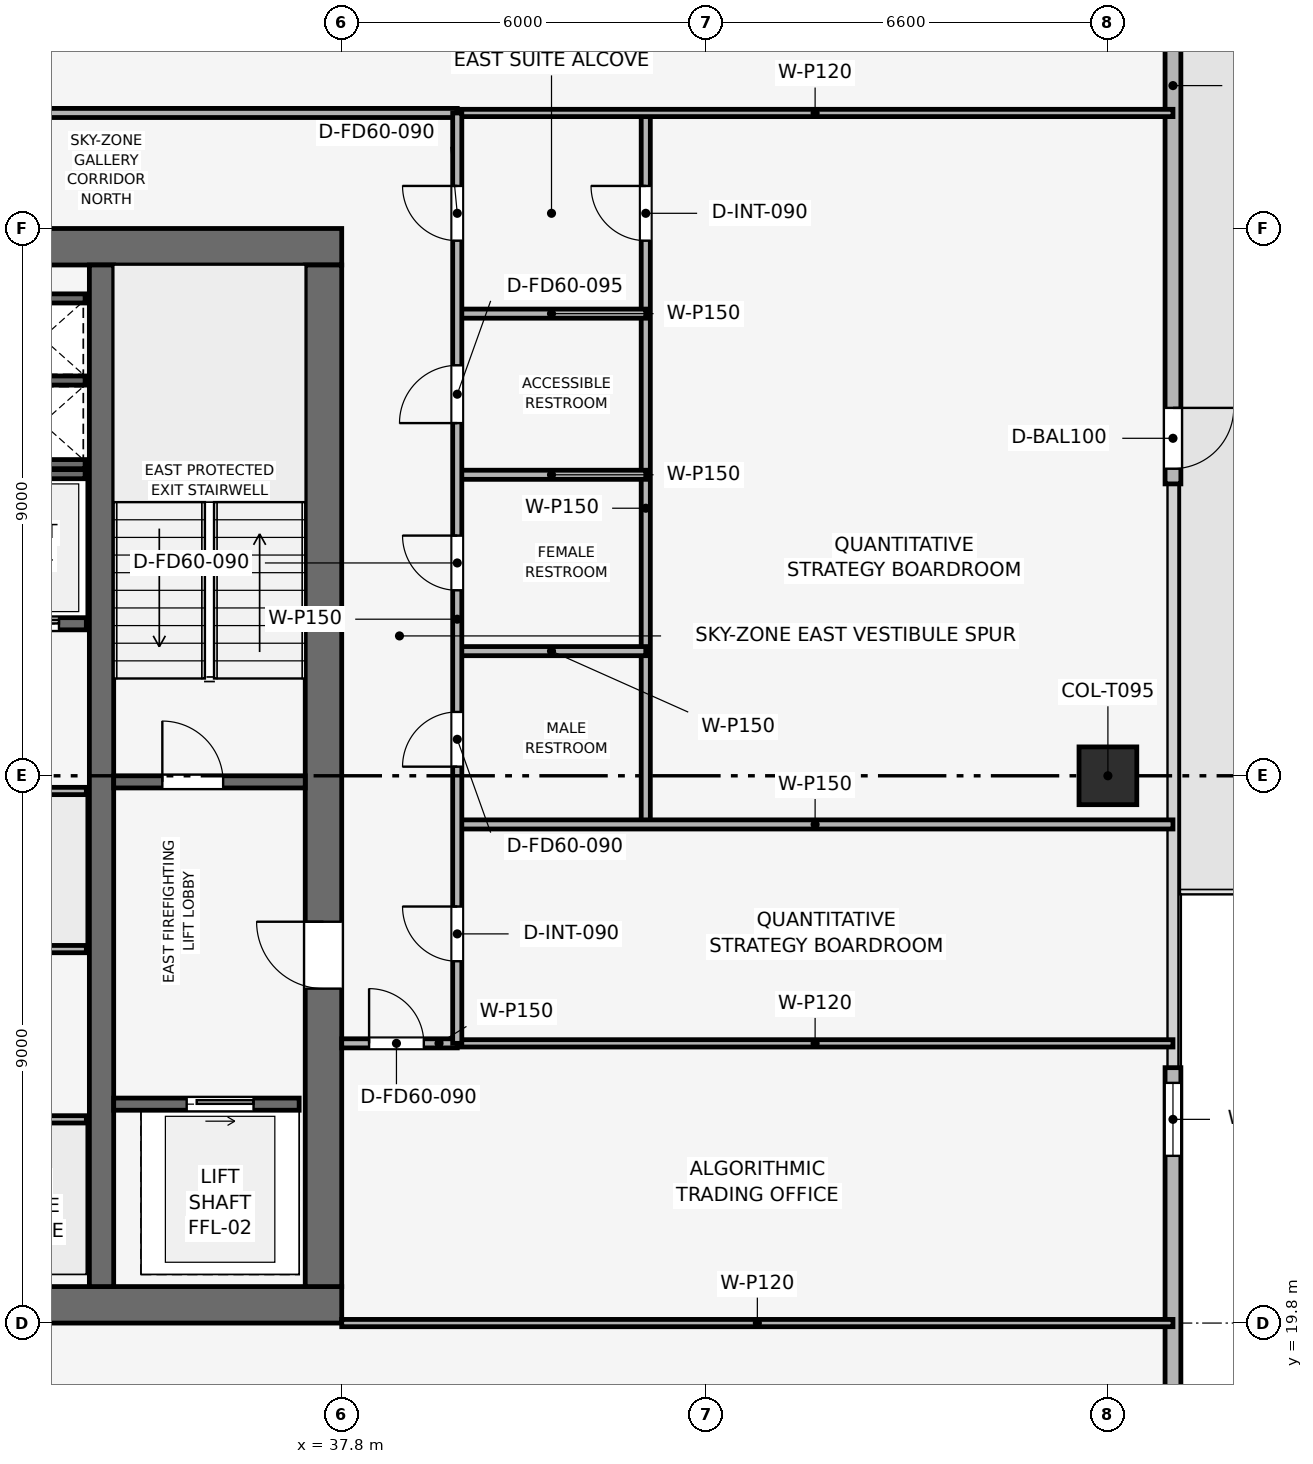
"""IFC4 building model, lengths in metres.
Left out: names, types, materials, properties, quantities, classifications, styles, units other than length and angle.
Written with IfcOpenShell. Run it as: python <this file> out.ifc"""

import sys

from ifc_helpers import new_model, si_unit, direction, frame, frame_2d, origin, origin_2d, place, context, subcontext, project, spatial, rectangle, extrude, element, fill, save


model = new_model("IFC4")
c1 = context("Model", 3, precision=1e-05, world=origin(), true_north=direction((0.0, 1.0)))
c2 = subcontext(c1, "Body", "Model", "MODEL_VIEW")
j1 = project(units=[si_unit("LENGTHUNIT", "METRE"), si_unit("PLANEANGLEUNIT", "RADIAN")], contexts=[c1])
p1 = place(None, origin())
s1 = spatial("IfcSite", under=j1, at=p1, CompositionType="ELEMENT")
p2 = place(p1, origin())
s2 = spatial("IfcBuilding", under=s1, at=p2, CompositionType="ELEMENT")
p3 = place(p2, frame((0.0, 0.0, 310.5)))
s3 = spatial("IfcBuildingStorey", under=s2, at=p3, CompositionType="ELEMENT", Elevation=310.5)
p4 = place(p3, frame((19.8, 20.1, 0.0), z_axis=(0.0, 0.0, 1.0), x_axis=(1.0, 0.0, 0.0)))
e1 = element("IfcWall", 1, at=p4, inside=s3, PredefinedType="SHEAR", context=c2, shape_type="SweptSolid", body=[
    extrude(rectangle(XDim=18.0, YDim=0.6, at=frame_2d((9.0, 0.0))), origin(), (0.0, 0.0, 1.0), 3.75),
])
p5 = place(p3, frame((19.8, 37.5, 0.0), z_axis=(0.0, 0.0, 1.0), x_axis=(1.0, 0.0, 0.0)))
e2 = element("IfcWall", 2, at=p5, inside=s3, PredefinedType="SHEAR", context=c2, shape_type="SweptSolid", body=[
    extrude(rectangle(XDim=18.0, YDim=0.6, at=frame_2d((9.0, 0.0))), origin(), (0.0, 0.0, 1.0), 3.75),
])
p6 = place(p5, frame((7.05, 0.0, 0.0)))
e3 = element("IfcOpeningElement", 3, at=p6, cuts=e2, PredefinedType="OPENING", context=c2, shape_type="SweptSolid", body=[
    extrude(rectangle(XDim=1.1, YDim=2.15, at=frame_2d((0.55, 1.075))), frame((0.0, 0.31, 0.0), z_axis=(0.0, -1.0, 0.0), x_axis=(1.0, 0.0, 0.0)), (0.0, 0.0, 1.0), 0.62),
])
p7 = place(p3, frame((37.5, 20.4, 0.0), z_axis=(0.0, 0.0, 1.0), x_axis=(0.0, 1.0, 0.0)))
e4 = element("IfcWall", 4, at=p7, inside=s3, PredefinedType="SHEAR", context=c2, shape_type="SweptSolid", body=[
    extrude(rectangle(XDim=16.8, YDim=0.6, at=frame_2d((8.4, 0.0))), origin(), (0.0, 0.0, 1.0), 3.75),
])
p8 = place(p7, frame((4.9, 0.0, 0.0)))
e5 = element("IfcOpeningElement", 5, at=p8, cuts=e4, PredefinedType="OPENING", context=c2, shape_type="SweptSolid", body=[
    extrude(rectangle(XDim=1.1, YDim=2.15, at=frame_2d((0.55, 1.075))), frame((0.0, 0.31, 0.0), z_axis=(0.0, -1.0, 0.0), x_axis=(1.0, 0.0, 0.0)), (0.0, 0.0, 1.0), 0.62),
])
p9 = place(p3, frame((33.85, 20.4, 0.0), z_axis=(0.0, 0.0, 1.0), x_axis=(0.0, 1.0, 0.0)))
e6 = element("IfcWall", 6, at=p9, inside=s3, PredefinedType="SHEAR", context=c2, shape_type="SweptSolid", body=[
    extrude(rectangle(XDim=16.8, YDim=0.4, at=frame_2d((8.4, 0.0))), origin(), (0.0, 0.0, 1.0), 3.75),
])
p10 = place(p3, frame((50.4, 28.8, 0.003), z_axis=(0.0, 0.0, 1.0), x_axis=(1.0, 0.0, 0.0)))
e7 = element("IfcColumn", 7, at=p10, inside=s3, PredefinedType="COLUMN", context=c2, shape_type="SweptSolid", body=[
    extrude(rectangle(XDim=0.95, YDim=0.95, at=origin_2d()), origin(), (0.0, 0.0, 1.0), 3.504),
])
p11 = place(p3, frame((51.47, 45.3, 0.0), z_axis=(0.0, 0.0, 1.0), x_axis=(0.0, -1.0, 0.0)))
e8 = element("IfcWall", 8, at=p11, inside=s3, PredefinedType="SOLIDWALL", context=c2, shape_type="SweptSolid", body=[
    extrude(rectangle(XDim=11.7, YDim=0.26, at=frame_2d((5.85, 0.0))), origin(), (0.0, 0.0, 1.0), 3.51),
])
p12 = place(p11, frame((10.45, 0.0, 0.0)))
e9 = element("IfcOpeningElement", 9, at=p12, cuts=e8, PredefinedType="OPENING", context=c2, shape_type="SweptSolid", body=[
    extrude(rectangle(XDim=1.0, YDim=2.2, at=frame_2d((0.5, 1.1))), frame((0.0, 0.14, 0.0), z_axis=(0.0, -1.0, 0.0), x_axis=(1.0, 0.0, 0.0)), (0.0, 0.0, 1.0), 0.28),
])
p13 = place(p3, frame((51.47, 24.0, 0.0), z_axis=(0.0, 0.0, 1.0), x_axis=(0.0, -1.0, 0.0)))
e10 = element("IfcWall", 10, at=p13, inside=s3, PredefinedType="SOLIDWALL", context=c2, shape_type="SweptSolid", body=[
    extrude(rectangle(XDim=11.7, YDim=0.26, at=frame_2d((5.85, 0.0))), origin(), (0.0, 0.0, 1.0), 3.51),
])
p14 = place(p13, frame((0.25, 0.0, 0.9)))
e11 = element("IfcOpeningElement", 11, at=p14, cuts=e10, PredefinedType="OPENING", context=c2, shape_type="SweptSolid", body=[
    extrude(rectangle(XDim=1.2, YDim=2.1, at=frame_2d((0.6, 1.05))), frame((0.0, 0.14, 0.0), z_axis=(0.0, -1.0, 0.0), x_axis=(1.0, 0.0, 0.0)), (0.0, 0.0, 1.0), 0.28),
])
p15 = place(p3, frame((34.05, 28.7, 0.0), z_axis=(0.0, 0.0, 1.0), x_axis=(1.0, 0.0, 0.0)))
e12 = element("IfcWall", 12, at=p15, inside=s3, PredefinedType="SHEAR", context=c2, shape_type="SweptSolid", body=[
    extrude(rectangle(XDim=3.15, YDim=0.2, at=frame_2d((1.575, 0.0))), origin(), (0.0, 0.0, 1.0), 3.51),
])
p16 = place(p15, frame((0.8, 0.0, 0.0)))
e13 = element("IfcOpeningElement", 13, at=p16, cuts=e12, PredefinedType="OPENING", context=c2, shape_type="SweptSolid", body=[
    extrude(rectangle(XDim=1.0, YDim=2.1, at=frame_2d((0.5, 1.05))), frame((0.0, 0.11, 0.0), z_axis=(0.0, -1.0, 0.0), x_axis=(1.0, 0.0, 0.0)), (0.0, 0.0, 1.0), 0.22),
])
for number, where, z_axis, x_axis in (
    (14, (32.25, 33.925, 0.0), (0.0, 0.0, 1.0), (1.0, 0.0, 0.0)),
    (15, (32.25, 35.3, 0.0), (0.0, 0.0, 1.0), (1.0, 0.0, 0.0)),
):
    element("IfcWall", number, at=place(p3, frame(where, z_axis=z_axis, x_axis=x_axis)), inside=s3, PredefinedType="SHEAR", context=c2, shape_type="SweptSolid", body=[
        extrude(rectangle(XDim=1.33, YDim=0.15, at=frame_2d((0.665, 0.0))), origin(), (0.0, 0.0, 1.0), 3.51),
    ])
p17 = place(p3, frame((34.05, 23.4, 0.0), z_axis=(0.0, 0.0, 1.0), x_axis=(1.0, 0.0, 0.0)))
e16 = element("IfcWall", 16, at=p17, inside=s3, PredefinedType="SHEAR", context=c2, shape_type="SweptSolid", body=[
    extrude(rectangle(XDim=3.05, YDim=0.2, at=frame_2d((1.525, 0.0))), origin(), (0.0, 0.0, 1.0), 3.51),
])
p18 = place(p17, frame((1.2, 0.0, 0.0)))
e17 = element("IfcOpeningElement", 17, at=p18, cuts=e16, PredefinedType="OPENING", context=c2, shape_type="SweptSolid", body=[
    extrude(rectangle(XDim=1.1, YDim=2.15, at=frame_2d((0.55, 1.075))), frame((0.0, 0.11, 0.0), z_axis=(0.0, -1.0, 0.0), x_axis=(1.0, 0.0, 0.0)), (0.0, 0.0, 1.0), 0.22),
])
p19 = place(p3, frame((31.6, 31.3, 0.0), z_axis=(0.0, 0.0, 1.0), x_axis=(1.0, 0.0, 0.0)))
e18 = element("IfcWall", 18, at=p19, inside=s3, PredefinedType="SHEAR", context=c2, shape_type="SweptSolid", body=[
    extrude(rectangle(XDim=2.0, YDim=0.2, at=frame_2d((1.0, 0.0))), origin(), (0.0, 0.0, 1.0), 3.51),
])
p20 = place(p19, frame((0.45, 0.0, 0.0)))
e19 = element("IfcOpeningElement", 19, at=p20, cuts=e18, PredefinedType="OPENING", context=c2, shape_type="SweptSolid", body=[
    extrude(rectangle(XDim=1.1, YDim=2.15, at=frame_2d((0.55, 1.075))), frame((0.0, 0.11, 0.0), z_axis=(0.0, -1.0, 0.0), x_axis=(1.0, 0.0, 0.0)), (0.0, 0.0, 1.0), 0.22),
])
p21 = place(p3, frame((32.25, 36.65, 0.0), z_axis=(0.0, 0.0, 1.0), x_axis=(1.0, 0.0, 0.0)))
e20 = element("IfcWall", 20, at=p21, inside=s3, PredefinedType="SHEAR", context=c2, shape_type="SweptSolid", body=[
    extrude(rectangle(XDim=1.33, YDim=0.15, at=frame_2d((0.665, 0.0))), origin(), (0.0, 0.0, 1.0), 3.51),
])
p22 = place(p3, frame((29.5, 33.76, 0.0), z_axis=(0.0, 0.0, 1.0), x_axis=(1.0, 0.0, 0.0)))
e21 = element("IfcWall", 21, at=p22, inside=s3, PredefinedType="SHEAR", context=c2, shape_type="SweptSolid", body=[
    extrude(rectangle(XDim=4.08, YDim=0.15, at=frame_2d((2.04, 0.0))), origin(), (0.0, 0.0, 1.0), 3.51),
])
p23 = place(p3, frame((29.55, 23.15, 0.0), z_axis=(0.0, 0.0, 1.0), x_axis=(1.0, 0.0, 0.0)))
e22 = element("IfcWall", 22, at=p23, inside=s3, PredefinedType="PARTITIONING", context=c2, shape_type="SweptSolid", body=[
    extrude(rectangle(XDim=4.05, YDim=0.12, at=frame_2d((2.025, 0.0))), origin(), (0.0, 0.0, 1.0), 3.51),
])
p24 = place(p23, frame((1.575, 0.0, 0.0)))
e23 = element("IfcOpeningElement", 23, at=p24, cuts=e22, PredefinedType="OPENING", context=c2, shape_type="SweptSolid", body=[
    extrude(rectangle(XDim=0.9, YDim=2.1, at=frame_2d((0.45, 1.05))), frame((0.0, 0.07, 0.0), z_axis=(0.0, -1.0, 0.0), x_axis=(1.0, 0.0, 0.0)), (0.0, 0.0, 1.0), 0.14),
])
p25 = place(p3, frame((29.55, 25.95, 0.0), z_axis=(0.0, 0.0, 1.0), x_axis=(1.0, 0.0, 0.0)))
e24 = element("IfcWall", 24, at=p25, inside=s3, PredefinedType="PARTITIONING", context=c2, shape_type="SweptSolid", body=[
    extrude(rectangle(XDim=4.05, YDim=0.12, at=frame_2d((2.025, 0.0))), origin(), (0.0, 0.0, 1.0), 3.51),
])
p26 = place(p25, frame((1.575, 0.0, 0.0)))
e25 = element("IfcOpeningElement", 25, at=p26, cuts=e24, PredefinedType="OPENING", context=c2, shape_type="SweptSolid", body=[
    extrude(rectangle(XDim=0.9, YDim=2.1, at=frame_2d((0.45, 1.05))), frame((0.0, 0.07, 0.0), z_axis=(0.0, -1.0, 0.0), x_axis=(1.0, 0.0, 0.0)), (0.0, 0.0, 1.0), 0.14),
])
p27 = place(p3, frame((29.55, 28.55, 0.0), z_axis=(0.0, 0.0, 1.0), x_axis=(1.0, 0.0, 0.0)))
e26 = element("IfcWall", 26, at=p27, inside=s3, PredefinedType="PARTITIONING", context=c2, shape_type="SweptSolid", body=[
    extrude(rectangle(XDim=4.05, YDim=0.12, at=frame_2d((2.025, 0.0))), origin(), (0.0, 0.0, 1.0), 3.51),
])
p28 = place(p3, frame((37.8, 19.8, 0.0), z_axis=(0.0, 0.0, 1.0), x_axis=(1.0, 0.0, 0.0)))
e27 = element("IfcWall", 27, at=p28, inside=s3, PredefinedType="PARTITIONING", context=c2, shape_type="SweptSolid", body=[
    extrude(rectangle(XDim=13.67, YDim=0.12, at=frame_2d((6.835, 0.0))), origin(), (0.0, 0.0, 1.0), 3.095),
])
p29 = place(p3, frame((37.8, 24.4, 0.0), z_axis=(0.0, 0.0, 1.0), x_axis=(1.0, 0.0, 0.0)))
e28 = element("IfcWall", 28, at=p29, inside=s3, PredefinedType="PARTITIONING", context=c2, shape_type="SweptSolid", body=[
    extrude(rectangle(XDim=1.9, YDim=0.15, at=frame_2d((0.95, 0.0))), origin(), (0.0, 0.0, 1.0), 3.51),
])
p30 = place(p29, frame((0.45, 0.0, 0.0)))
e29 = element("IfcOpeningElement", 29, at=p30, cuts=e28, PredefinedType="OPENING", context=c2, shape_type="SweptSolid", body=[
    extrude(rectangle(XDim=0.9, YDim=2.1, at=frame_2d((0.45, 1.05))), frame((0.0, 0.085, 0.0), z_axis=(0.0, -1.0, 0.0), x_axis=(1.0, 0.0, 0.0)), (0.0, 0.0, 1.0), 0.17),
])
p31 = place(p3, frame((39.7, 24.4, 0.0), z_axis=(0.0, 0.0, 1.0), x_axis=(1.0, 0.0, 0.0)))
e30 = element("IfcWall", 30, at=p31, inside=s3, PredefinedType="PARTITIONING", context=c2, shape_type="SweptSolid", body=[
    extrude(rectangle(XDim=11.77, YDim=0.12, at=frame_2d((5.885, 0.0))), origin(), (0.0, 0.0, 1.0), 3.135),
])
p32 = place(p3, frame((42.8, 28.0, 0.0), z_axis=(0.0, 0.0, 1.0), x_axis=(0.0, 1.0, 0.0)))
e31 = element("IfcWall", 31, at=p32, inside=s3, PredefinedType="PARTITIONING", context=c2, shape_type="SweptSolid", body=[
    extrude(rectangle(XDim=11.7, YDim=0.15, at=frame_2d((5.85, 0.0))), origin(), (0.0, 0.0, 1.0), 3.095),
])
p33 = place(p32, frame((9.6, 0.0, 0.0)))
e32 = element("IfcOpeningElement", 32, at=p33, cuts=e31, PredefinedType="OPENING", context=c2, shape_type="SweptSolid", body=[
    extrude(rectangle(XDim=0.9, YDim=2.1, at=frame_2d((0.45, 1.05))), frame((0.0, 0.085, 0.0), z_axis=(0.0, -1.0, 0.0), x_axis=(1.0, 0.0, 0.0)), (0.0, 0.0, 1.0), 0.17),
])
p34 = place(p3, frame((39.7, 28.0, 0.0), z_axis=(0.0, 0.0, 1.0), x_axis=(1.0, 0.0, 0.0)))
e33 = element("IfcWall", 33, at=p34, inside=s3, PredefinedType="PARTITIONING", context=c2, shape_type="SweptSolid", body=[
    extrude(rectangle(XDim=11.77, YDim=0.15, at=frame_2d((5.885, 0.0))), origin(), (0.0, 0.0, 1.0), 3.135),
])
for number, where, z_axis, x_axis in (
    (34, (39.7, 36.4, 0.0), (0.0, 0.0, 1.0), (1.0, 0.0, 0.0)),
    (35, (39.7, 30.85, 0.0), (0.0, 0.0, 1.0), (1.0, 0.0, 0.0)),
    (36, (39.7, 33.75, 0.0), (0.0, 0.0, 1.0), (1.0, 0.0, 0.0)),
):
    element("IfcWall", number, at=place(p3, frame(where, z_axis=z_axis, x_axis=x_axis)), inside=s3, PredefinedType="PARTITIONING", context=c2, shape_type="SweptSolid", body=[
        extrude(rectangle(XDim=3.1, YDim=0.15, at=frame_2d((1.55, 0.0))), origin(), (0.0, 0.0, 1.0), 3.135),
    ])
p35 = place(p3, frame((39.7, 39.7, 0.0), z_axis=(0.0, 0.0, 1.0), x_axis=(1.0, 0.0, 0.0)))
e37 = element("IfcWall", 37, at=p35, inside=s3, PredefinedType="PARTITIONING", context=c2, shape_type="SweptSolid", body=[
    extrude(rectangle(XDim=11.77, YDim=0.12, at=frame_2d((5.885, 0.0))), origin(), (0.0, 0.0, 1.0), 3.095),
])
p36 = place(p3, frame((17.9, 39.7, 0.0), z_axis=(0.0, 0.0, 1.0), x_axis=(1.0, 0.0, 0.0)))
e38 = element("IfcWall", 38, at=p36, inside=s3, PredefinedType="PARTITIONING", context=c2, shape_type="SweptSolid", body=[
    extrude(rectangle(XDim=21.8, YDim=0.15, at=frame_2d((10.9, 0.0))), origin(), (0.0, 0.0, 1.0), 3.095),
])
p37 = place(p36, frame((10.45, 0.0, 0.0)))
e39 = element("IfcOpeningElement", 39, at=p37, cuts=e38, PredefinedType="OPENING", context=c2, shape_type="SweptSolid", body=[
    extrude(rectangle(XDim=0.9, YDim=2.1, at=frame_2d((0.45, 1.05))), frame((0.0, 0.085, 0.0), z_axis=(0.0, -1.0, 0.0), x_axis=(1.0, 0.0, 0.0)), (0.0, 0.0, 1.0), 0.17),
])
p38 = place(p3, frame((39.7, 24.4, 0.0), z_axis=(0.0, 0.0, 1.0), x_axis=(0.0, 1.0, 0.0)))
e40 = element("IfcWall", 40, at=p38, inside=s3, PredefinedType="PARTITIONING", context=c2, shape_type="SweptSolid", body=[
    extrude(rectangle(XDim=15.3, YDim=0.15, at=frame_2d((7.65, 0.0))), origin(), (0.0, 0.0, 1.0), 3.095),
])
p39 = place(p38, frame((1.35, 0.0, 0.0)))
e41 = element("IfcOpeningElement", 41, at=p39, cuts=e40, PredefinedType="OPENING", context=c2, shape_type="SweptSolid", body=[
    extrude(rectangle(XDim=0.9, YDim=2.1, at=frame_2d((0.45, 1.05))), frame((0.0, 0.085, 0.0), z_axis=(0.0, -1.0, 0.0), x_axis=(1.0, 0.0, 0.0)), (0.0, 0.0, 1.0), 0.17),
])
p40 = place(p38, frame((4.55, 0.0, 0.0)))
e42 = element("IfcOpeningElement", 42, at=p40, cuts=e40, PredefinedType="OPENING", context=c2, shape_type="SweptSolid", body=[
    extrude(rectangle(XDim=0.9, YDim=2.1, at=frame_2d((0.45, 1.05))), frame((0.0, 0.085, 0.0), z_axis=(0.0, -1.0, 0.0), x_axis=(1.0, 0.0, 0.0)), (0.0, 0.0, 1.0), 0.17),
])
p41 = place(p38, frame((7.45, 0.0, 0.0)))
e43 = element("IfcOpeningElement", 43, at=p41, cuts=e40, PredefinedType="OPENING", context=c2, shape_type="SweptSolid", body=[
    extrude(rectangle(XDim=0.9, YDim=2.1, at=frame_2d((0.45, 1.05))), frame((0.0, 0.085, 0.0), z_axis=(0.0, -1.0, 0.0), x_axis=(1.0, 0.0, 0.0)), (0.0, 0.0, 1.0), 0.17),
])
p42 = place(p38, frame((10.2, 0.0, 0.0)))
e44 = element("IfcOpeningElement", 44, at=p42, cuts=e40, PredefinedType="OPENING", context=c2, shape_type="SweptSolid", body=[
    extrude(rectangle(XDim=0.95, YDim=2.1, at=frame_2d((0.475, 1.05))), frame((0.0, 0.085, 0.0), z_axis=(0.0, -1.0, 0.0), x_axis=(1.0, 0.0, 0.0)), (0.0, 0.0, 1.0), 0.17),
])
p43 = place(p38, frame((13.2, 0.0, 0.0)))
e45 = element("IfcOpeningElement", 45, at=p43, cuts=e40, PredefinedType="OPENING", context=c2, shape_type="SweptSolid", body=[
    extrude(rectangle(XDim=0.9, YDim=2.1, at=frame_2d((0.45, 1.05))), frame((0.0, 0.085, 0.0), z_axis=(0.0, -1.0, 0.0), x_axis=(1.0, 0.0, 0.0)), (0.0, 0.0, 1.0), 0.17),
])
p44 = place(p12, origin())
e46 = element("IfcDoor", 46, at=p44, inside=s3, OperationType="SINGLE_SWING_LEFT", PredefinedType="DOOR", context=c2, shape_type="SweptSolid", body=[
    extrude(rectangle(XDim=1.0, YDim=2.2, at=frame_2d((0.5, 1.1))), frame((0.0, 0.025, 0.0), z_axis=(0.0, -1.0, 0.0), x_axis=(1.0, 0.0, 0.0)), (0.0, 0.0, 1.0), 0.05),
])
fill(e9, e46)
p45 = place(p14, origin())
e47 = element("IfcWindow", 47, at=p45, inside=s3, PartitioningType="SINGLE_PANEL", PredefinedType="WINDOW", context=c2, shape_type="SweptSolid", body=[
    extrude(rectangle(XDim=1.2, YDim=2.1, at=frame_2d((0.6, 1.05))), frame((0.0, 0.03, 0.0), z_axis=(0.0, -1.0, 0.0), x_axis=(1.0, 0.0, 0.0)), (0.0, 0.0, 1.0), 0.06),
])
fill(e11, e47)
p46 = place(p16, origin())
e48 = element("IfcDoor", 48, at=p46, inside=s3, OperationType="SINGLE_SWING_LEFT", PredefinedType="DOOR", context=c2, shape_type="SweptSolid", body=[
    extrude(rectangle(XDim=1.0, YDim=2.1, at=frame_2d((0.5, 1.05))), frame((0.0, 0.025, 0.0), z_axis=(0.0, -1.0, 0.0), x_axis=(1.0, 0.0, 0.0)), (0.0, 0.0, 1.0), 0.05),
])
fill(e13, e48)
p47 = place(p18, origin())
e49 = element("IfcDoor", 49, at=p47, inside=s3, OperationType="SLIDING_TO_RIGHT", PredefinedType="DOOR", context=c2, shape_type="SweptSolid", body=[
    extrude(rectangle(XDim=1.1, YDim=2.15, at=frame_2d((0.55, 1.075))), frame((0.0, 0.025, 0.0), z_axis=(0.0, -1.0, 0.0), x_axis=(1.0, 0.0, 0.0)), (0.0, 0.0, 1.0), 0.05),
])
fill(e17, e49)
p48 = place(p20, origin())
e50 = element("IfcDoor", 50, at=p48, inside=s3, OperationType="SLIDING_TO_RIGHT", PredefinedType="DOOR", context=c2, shape_type="SweptSolid", body=[
    extrude(rectangle(XDim=1.1, YDim=2.15, at=frame_2d((0.55, 1.075))), frame((0.0, 0.025, 0.0), z_axis=(0.0, -1.0, 0.0), x_axis=(1.0, 0.0, 0.0)), (0.0, 0.0, 1.0), 0.05),
])
fill(e19, e50)
p49 = place(p30, origin())
e51 = element("IfcDoor", 51, at=p49, inside=s3, OperationType="SINGLE_SWING_LEFT", PredefinedType="DOOR", context=c2, shape_type="SweptSolid", body=[
    extrude(rectangle(XDim=0.9, YDim=2.1, at=frame_2d((0.45, 1.05))), frame((0.0, 0.025, 0.0), z_axis=(0.0, -1.0, 0.0), x_axis=(1.0, 0.0, 0.0)), (0.0, 0.0, 1.0), 0.05),
])
fill(e29, e51)
p50 = place(p33, origin())
e52 = element("IfcDoor", 52, at=p50, inside=s3, OperationType="SINGLE_SWING_RIGHT", PredefinedType="DOOR", context=c2, shape_type="SweptSolid", body=[
    extrude(rectangle(XDim=0.9, YDim=2.1, at=frame_2d((0.45, 1.05))), frame((0.0, 0.025, 0.0), z_axis=(0.0, -1.0, 0.0), x_axis=(1.0, 0.0, 0.0)), (0.0, 0.0, 1.0), 0.05),
])
fill(e32, e52)
p51 = place(p39, origin())
e53 = element("IfcDoor", 53, at=p51, inside=s3, OperationType="SINGLE_SWING_RIGHT", PredefinedType="DOOR", context=c2, shape_type="SweptSolid", body=[
    extrude(rectangle(XDim=0.9, YDim=2.1, at=frame_2d((0.45, 1.05))), frame((0.0, 0.025, 0.0), z_axis=(0.0, -1.0, 0.0), x_axis=(1.0, 0.0, 0.0)), (0.0, 0.0, 1.0), 0.05),
])
fill(e41, e53)
p52 = place(p40, origin())
e54 = element("IfcDoor", 54, at=p52, inside=s3, OperationType="SINGLE_SWING_LEFT", PredefinedType="DOOR", context=c2, shape_type="SweptSolid", body=[
    extrude(rectangle(XDim=0.9, YDim=2.1, at=frame_2d((0.45, 1.05))), frame((0.0, 0.025, 0.0), z_axis=(0.0, -1.0, 0.0), x_axis=(1.0, 0.0, 0.0)), (0.0, 0.0, 1.0), 0.05),
])
fill(e42, e54)
p53 = place(p41, origin())
e55 = element("IfcDoor", 55, at=p53, inside=s3, OperationType="SINGLE_SWING_RIGHT", PredefinedType="DOOR", context=c2, shape_type="SweptSolid", body=[
    extrude(rectangle(XDim=0.9, YDim=2.1, at=frame_2d((0.45, 1.05))), frame((0.0, 0.025, 0.0), z_axis=(0.0, -1.0, 0.0), x_axis=(1.0, 0.0, 0.0)), (0.0, 0.0, 1.0), 0.05),
])
fill(e43, e55)
p54 = place(p42, origin())
e56 = element("IfcDoor", 56, at=p54, inside=s3, OperationType="SINGLE_SWING_LEFT", PredefinedType="DOOR", context=c2, shape_type="SweptSolid", body=[
    extrude(rectangle(XDim=0.95, YDim=2.1, at=frame_2d((0.475, 1.05))), frame((0.0, 0.025, 0.0), z_axis=(0.0, -1.0, 0.0), x_axis=(1.0, 0.0, 0.0)), (0.0, 0.0, 1.0), 0.05),
])
fill(e44, e56)
p55 = place(p43, origin())
e57 = element("IfcDoor", 57, at=p55, inside=s3, OperationType="SINGLE_SWING_RIGHT", PredefinedType="DOOR", context=c2, shape_type="SweptSolid", body=[
    extrude(rectangle(XDim=0.9, YDim=2.1, at=frame_2d((0.45, 1.05))), frame((0.0, 0.025, 0.0), z_axis=(0.0, -1.0, 0.0), x_axis=(1.0, 0.0, 0.0)), (0.0, 0.0, 1.0), 0.05),
])
fill(e45, e57)
p56 = place(p8, origin())
e58 = element("IfcDoor", 58, at=p56, inside=s3, OperationType="SINGLE_SWING_RIGHT", PredefinedType="DOOR", context=c2, shape_type="SweptSolid", body=[
    extrude(rectangle(XDim=1.1, YDim=2.15, at=frame_2d((0.55, 1.075))), frame((0.0, 0.025, 0.0), z_axis=(0.0, -1.0, 0.0), x_axis=(1.0, 0.0, 0.0)), (0.0, 0.0, 1.0), 0.05),
])
fill(e5, e58)
save(model, sys.argv[1])
